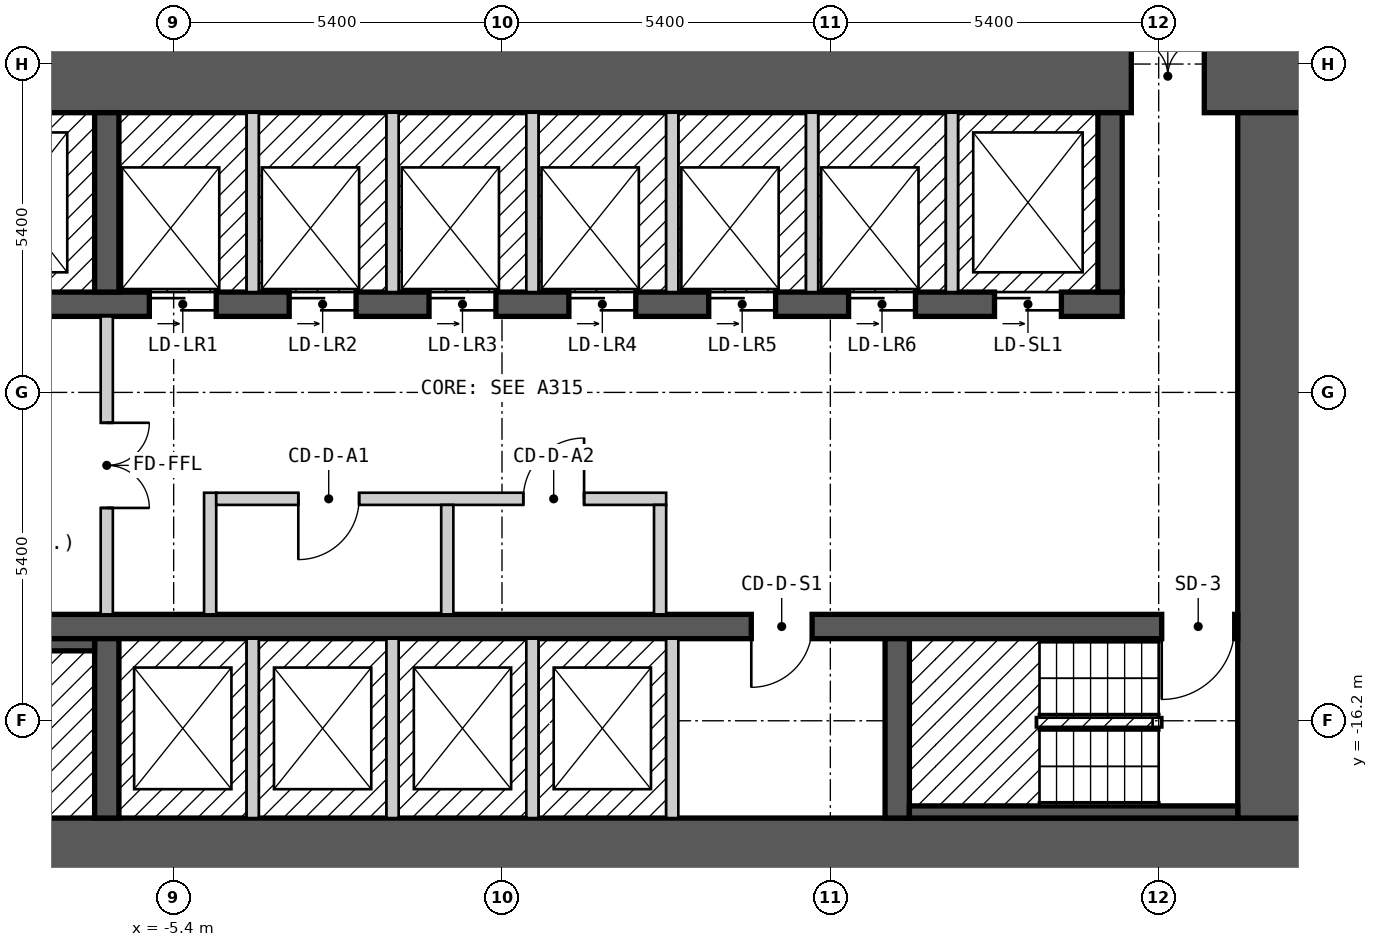
"""IFC4 building model, lengths in metres.
Left out: names, types, materials, properties, quantities, classifications, styles, units other than length and angle.
Written with IfcOpenShell. Run it as: python <this file> out.ifc"""

import sys

from ifc_helpers import new_model, si_unit, direction, frame, frame_2d, origin, place, context, subcontext, project, spatial, rectangle, extrude, element, fill, save


model = new_model("IFC4")
c1 = context("Model", 3, precision=1e-05, world=origin(), true_north=direction((0.0, 1.0)))
c2 = subcontext(c1, "Body", "Model", "MODEL_VIEW")
j1 = project(units=[si_unit("LENGTHUNIT", "METRE"), si_unit("PLANEANGLEUNIT", "RADIAN")], contexts=[c1])
p1 = place(None, origin())
s1 = spatial("IfcSite", under=j1, at=p1, CompositionType="ELEMENT")
p2 = place(p1, origin())
s2 = spatial("IfcBuilding", under=s1, at=p2, CompositionType="ELEMENT")
p3 = place(p2, frame((0.0, 0.0, 44.4)))
s3 = spatial("IfcBuildingStorey", under=s2, at=p3, CompositionType="ELEMENT", Elevation=44.4)
p4 = place(p3, frame((-13.3, -18.4, 0.0), z_axis=(0.0, 0.0, 1.0), x_axis=(1.0, 0.0, 0.0)))
e1 = element("IfcWall", 1, at=p4, inside=s3, PredefinedType="SHEAR", context=c2, shape_type="SweptSolid", body=[
    extrude(rectangle(XDim=26.6, YDim=1.2, at=frame_2d((13.3, 0.0))), origin(), (0.0, 0.0, 1.0), 2.7),
])
p5 = place(p3, frame((-13.3, -5.6, 0.0), z_axis=(0.0, 0.0, 1.0), x_axis=(1.0, 0.0, 0.0)))
e2 = element("IfcWall", 2, at=p5, inside=s3, PredefinedType="SHEAR", context=c2, shape_type="SweptSolid", body=[
    extrude(rectangle(XDim=26.6, YDim=1.2, at=frame_2d((13.3, 0.0))), origin(), (0.0, 0.0, 1.0), 2.7),
])
p6 = place(p5, frame((23.65, 0.0, 0.0)))
e3 = element("IfcOpeningElement", 3, at=p6, cuts=e2, PredefinedType="OPENING", context=c2, shape_type="SweptSolid", body=[
    extrude(rectangle(XDim=1.2, YDim=2.1, at=frame_2d((0.6, 1.05))), frame((0.0, 0.61, 0.0), z_axis=(0.0, -1.0, 0.0), x_axis=(1.0, 0.0, 0.0)), (0.0, 0.0, 1.0), 1.22),
])
p7 = place(p3, frame((12.7, -17.8, 0.0), z_axis=(0.0, 0.0, 1.0), x_axis=(0.0, 1.0, 0.0)))
e4 = element("IfcWall", 4, at=p7, inside=s3, PredefinedType="SHEAR", context=c2, shape_type="SweptSolid", body=[
    extrude(rectangle(XDim=11.6, YDim=1.2, at=frame_2d((5.8, 0.0))), origin(), (0.0, 0.0, 1.0), 2.7),
])
p8 = place(p3, frame((-12.1, -14.65, 0.0), z_axis=(0.0, 0.0, 1.0), x_axis=(1.0, 0.0, 0.0)))
e5 = element("IfcWall", 5, at=p8, inside=s3, PredefinedType="SHEAR", context=c2, shape_type="SweptSolid", body=[
    extrude(rectangle(XDim=24.2, YDim=0.4, at=frame_2d((12.1, 0.0))), origin(), (0.0, 0.0, 1.0), 2.7),
])
p9 = place(p8, frame((1.3, 0.0, 0.0), z_axis=(0.0, 0.0, 1.0), x_axis=(-1.0, 0.0, 0.0)))
e6 = element("IfcOpeningElement", 6, at=p9, cuts=e5, PredefinedType="OPENING", context=c2, shape_type="SweptSolid", body=[
    extrude(rectangle(XDim=1.2, YDim=2.1, at=frame_2d((0.6, 1.05))), frame((0.0, 0.21, 0.0), z_axis=(0.0, -1.0, 0.0), x_axis=(1.0, 0.0, 0.0)), (0.0, 0.0, 1.0), 0.42),
])
p10 = place(p8, frame((24.15, 0.0, 0.0), z_axis=(0.0, 0.0, 1.0), x_axis=(-1.0, 0.0, 0.0)))
e7 = element("IfcOpeningElement", 7, at=p10, cuts=e5, PredefinedType="OPENING", context=c2, shape_type="SweptSolid", body=[
    extrude(rectangle(XDim=1.2, YDim=2.1, at=frame_2d((0.6, 1.05))), frame((0.0, 0.21, 0.0), z_axis=(0.0, -1.0, 0.0), x_axis=(1.0, 0.0, 0.0)), (0.0, 0.0, 1.0), 0.42),
])
p11 = place(p8, frame((17.2, 0.0, 0.0), z_axis=(0.0, 0.0, 1.0), x_axis=(-1.0, 0.0, 0.0)))
e8 = element("IfcOpeningElement", 8, at=p11, cuts=e5, PredefinedType="OPENING", context=c2, shape_type="SweptSolid", body=[
    extrude(rectangle(XDim=1.0, YDim=2.1, at=frame_2d((0.5, 1.05))), frame((0.0, 0.21, 0.0), z_axis=(0.0, -1.0, 0.0), x_axis=(1.0, 0.0, 0.0)), (0.0, 0.0, 1.0), 0.42),
])
p12 = place(p3, frame((-12.1, -9.35, 0.0), z_axis=(0.0, 0.0, 1.0), x_axis=(1.0, 0.0, 0.0)))
e9 = element("IfcWall", 9, at=p12, inside=s3, PredefinedType="SHEAR", context=c2, shape_type="SweptSolid", body=[
    extrude(rectangle(XDim=22.3, YDim=0.4, at=frame_2d((11.15, 0.0))), origin(), (0.0, 0.0, 1.0), 2.7),
])
p13 = place(p12, frame((0.7, 0.0, 0.0)))
e10 = element("IfcOpeningElement", 10, at=p13, cuts=e9, PredefinedType="OPENING", context=c2, shape_type="SweptSolid", body=[
    extrude(rectangle(XDim=1.1, YDim=2.1, at=frame_2d((0.55, 1.05))), frame((0.0, 0.21, 0.0), z_axis=(0.0, -1.0, 0.0), x_axis=(1.0, 0.0, 0.0)), (0.0, 0.0, 1.0), 0.42),
])
p14 = place(p12, frame((3.5, 0.0, 0.0)))
e11 = element("IfcOpeningElement", 11, at=p14, cuts=e9, PredefinedType="OPENING", context=c2, shape_type="SweptSolid", body=[
    extrude(rectangle(XDim=1.1, YDim=2.1, at=frame_2d((0.55, 1.05))), frame((0.0, 0.21, 0.0), z_axis=(0.0, -1.0, 0.0), x_axis=(1.0, 0.0, 0.0)), (0.0, 0.0, 1.0), 0.42),
])
p15 = place(p12, frame((6.3, 0.0, 0.0)))
e12 = element("IfcOpeningElement", 12, at=p15, cuts=e9, PredefinedType="OPENING", context=c2, shape_type="SweptSolid", body=[
    extrude(rectangle(XDim=1.1, YDim=2.1, at=frame_2d((0.55, 1.05))), frame((0.0, 0.21, 0.0), z_axis=(0.0, -1.0, 0.0), x_axis=(1.0, 0.0, 0.0)), (0.0, 0.0, 1.0), 0.42),
])
p16 = place(p12, frame((8.6, 0.0, 0.0)))
e13 = element("IfcOpeningElement", 13, at=p16, cuts=e9, PredefinedType="OPENING", context=c2, shape_type="SweptSolid", body=[
    extrude(rectangle(XDim=1.1, YDim=2.1, at=frame_2d((0.55, 1.05))), frame((0.0, 0.21, 0.0), z_axis=(0.0, -1.0, 0.0), x_axis=(1.0, 0.0, 0.0)), (0.0, 0.0, 1.0), 0.42),
])
p17 = place(p12, frame((10.9, 0.0, 0.0)))
e14 = element("IfcOpeningElement", 14, at=p17, cuts=e9, PredefinedType="OPENING", context=c2, shape_type="SweptSolid", body=[
    extrude(rectangle(XDim=1.1, YDim=2.1, at=frame_2d((0.55, 1.05))), frame((0.0, 0.21, 0.0), z_axis=(0.0, -1.0, 0.0), x_axis=(1.0, 0.0, 0.0)), (0.0, 0.0, 1.0), 0.42),
])
p18 = place(p12, frame((13.2, 0.0, 0.0)))
e15 = element("IfcOpeningElement", 15, at=p18, cuts=e9, PredefinedType="OPENING", context=c2, shape_type="SweptSolid", body=[
    extrude(rectangle(XDim=1.1, YDim=2.1, at=frame_2d((0.55, 1.05))), frame((0.0, 0.21, 0.0), z_axis=(0.0, -1.0, 0.0), x_axis=(1.0, 0.0, 0.0)), (0.0, 0.0, 1.0), 0.42),
])
p19 = place(p12, frame((15.5, 0.0, 0.0)))
e16 = element("IfcOpeningElement", 16, at=p19, cuts=e9, PredefinedType="OPENING", context=c2, shape_type="SweptSolid", body=[
    extrude(rectangle(XDim=1.1, YDim=2.1, at=frame_2d((0.55, 1.05))), frame((0.0, 0.21, 0.0), z_axis=(0.0, -1.0, 0.0), x_axis=(1.0, 0.0, 0.0)), (0.0, 0.0, 1.0), 0.42),
])
p20 = place(p12, frame((17.8, 0.0, 0.0)))
e17 = element("IfcOpeningElement", 17, at=p20, cuts=e9, PredefinedType="OPENING", context=c2, shape_type="SweptSolid", body=[
    extrude(rectangle(XDim=1.1, YDim=2.1, at=frame_2d((0.55, 1.05))), frame((0.0, 0.21, 0.0), z_axis=(0.0, -1.0, 0.0), x_axis=(1.0, 0.0, 0.0)), (0.0, 0.0, 1.0), 0.42),
])
p21 = place(p12, frame((20.2, 0.0, 0.0)))
e18 = element("IfcOpeningElement", 18, at=p21, cuts=e9, PredefinedType="OPENING", context=c2, shape_type="SweptSolid", body=[
    extrude(rectangle(XDim=1.1, YDim=2.1, at=frame_2d((0.55, 1.05))), frame((0.0, 0.21, 0.0), z_axis=(0.0, -1.0, 0.0), x_axis=(1.0, 0.0, 0.0)), (0.0, 0.0, 1.0), 0.42),
])
for number, where, z_axis, x_axis in (
    (19, (-6.5, -17.8, 0.0), (0.0, 0.0, 1.0), (0.0, 1.0, 0.0)),
    (20, (6.5, -17.8, 0.0), (0.0, 0.0, 1.0), (0.0, 1.0, 0.0)),
    (21, (-6.5, -9.15, 0.0), (0.0, 0.0, 1.0), (0.0, 1.0, 0.0)),
    (22, (10.0, -9.15, 0.0), (0.0, 0.0, 1.0), (0.0, 1.0, 0.0)),
):
    element("IfcWall", number, at=place(p3, frame(where, z_axis=z_axis, x_axis=x_axis)), inside=s3, PredefinedType="SHEAR", context=c2, shape_type="SweptSolid", body=[
        extrude(rectangle(XDim=2.95, YDim=0.4, at=frame_2d((1.475, 0.0))), origin(), (0.0, 0.0, 1.0), 2.7),
    ])
p22 = place(p3, frame((-10.8, -14.95, 0.0), z_axis=(0.0, 0.0, 1.0), x_axis=(1.0, 0.0, 0.0)))
e23 = element("IfcWall", 23, at=p22, inside=s3, PredefinedType="SOLIDWALL", context=c2, shape_type="SweptSolid", body=[
    extrude(rectangle(XDim=4.1, YDim=0.2, at=frame_2d((2.05, 0.0))), origin(), (0.0, 0.0, 1.0), 2.7),
])
p23 = place(p3, frame((-6.5, -14.45, 0.0), z_axis=(0.0, 0.0, 1.0), x_axis=(0.0, 1.0, 0.0)))
e24 = element("IfcWall", 24, at=p23, inside=s3, PredefinedType="PARTITIONING", context=c2, shape_type="SweptSolid", body=[
    extrude(rectangle(XDim=4.9, YDim=0.2, at=frame_2d((2.45, 0.0))), origin(), (0.0, 0.0, 1.0), 2.7),
])
p24 = place(p23, frame((3.15, 0.0, 0.0), z_axis=(0.0, 0.0, 1.0), x_axis=(-1.0, 0.0, 0.0)))
e25 = element("IfcOpeningElement", 25, at=p24, cuts=e24, PredefinedType="OPENING", context=c2, shape_type="SweptSolid", body=[
    extrude(rectangle(XDim=1.4, YDim=2.1, at=frame_2d((0.7, 1.05))), frame((0.0, 0.11, 0.0), z_axis=(0.0, -1.0, 0.0), x_axis=(1.0, 0.0, 0.0)), (0.0, 0.0, 1.0), 0.22),
])
p25 = place(p3, frame((-4.8, -14.45, 0.0), z_axis=(0.0, 0.0, 1.0), x_axis=(0.0, 1.0, 0.0)))
e26 = element("IfcWall", 26, at=p25, inside=s3, PredefinedType="PARTITIONING", context=c2, shape_type="SweptSolid", body=[
    extrude(rectangle(XDim=2.0, YDim=0.2, at=frame_2d((1.0, 0.0))), origin(), (0.0, 0.0, 1.0), 2.7),
])
p26 = place(p3, frame((-4.7, -12.55, 0.0), z_axis=(0.0, 0.0, 1.0), x_axis=(1.0, 0.0, 0.0)))
e27 = element("IfcWall", 27, at=p26, inside=s3, PredefinedType="PARTITIONING", context=c2, shape_type="SweptSolid", body=[
    extrude(rectangle(XDim=7.4, YDim=0.2, at=frame_2d((3.7, 0.0))), origin(), (0.0, 0.0, 1.0), 2.7),
])
p27 = place(p26, frame((2.35, 0.0, 0.0), z_axis=(0.0, 0.0, 1.0), x_axis=(-1.0, 0.0, 0.0)))
e28 = element("IfcOpeningElement", 28, at=p27, cuts=e27, PredefinedType="OPENING", context=c2, shape_type="SweptSolid", body=[
    extrude(rectangle(XDim=1.0, YDim=2.1, at=frame_2d((0.5, 1.05))), frame((0.0, 0.11, 0.0), z_axis=(0.0, -1.0, 0.0), x_axis=(1.0, 0.0, 0.0)), (0.0, 0.0, 1.0), 0.22),
])
p28 = place(p26, frame((6.05, 0.0, 0.0), z_axis=(0.0, 0.0, 1.0), x_axis=(-1.0, 0.0, 0.0)))
e29 = element("IfcOpeningElement", 29, at=p28, cuts=e27, PredefinedType="OPENING", context=c2, shape_type="SweptSolid", body=[
    extrude(rectangle(XDim=1.0, YDim=2.1, at=frame_2d((0.5, 1.05))), frame((0.0, 0.11, 0.0), z_axis=(0.0, -1.0, 0.0), x_axis=(1.0, 0.0, 0.0)), (0.0, 0.0, 1.0), 0.22),
])
for number, where, z_axis, x_axis in (
    (30, (-4.1, -17.8, 0.0), (0.0, 0.0, 1.0), (0.0, 1.0, 0.0)),
    (31, (-4.1, -9.15, 0.0), (0.0, 0.0, 1.0), (0.0, 1.0, 0.0)),
    (32, (-1.8, -17.8, 0.0), (0.0, 0.0, 1.0), (0.0, 1.0, 0.0)),
    (33, (-1.8, -9.15, 0.0), (0.0, 0.0, 1.0), (0.0, 1.0, 0.0)),
):
    element("IfcWall", number, at=place(p3, frame(where, z_axis=z_axis, x_axis=x_axis)), inside=s3, PredefinedType="SOLIDWALL", context=c2, shape_type="SweptSolid", body=[
        extrude(rectangle(XDim=2.95, YDim=0.2, at=frame_2d((1.475, 0.0))), origin(), (0.0, 0.0, 1.0), 2.7),
    ])
p29 = place(p3, frame((-0.9, -14.45, 0.0), z_axis=(0.0, 0.0, 1.0), x_axis=(0.0, 1.0, 0.0)))
e34 = element("IfcWall", 34, at=p29, inside=s3, PredefinedType="PARTITIONING", context=c2, shape_type="SweptSolid", body=[
    extrude(rectangle(XDim=1.8, YDim=0.2, at=frame_2d((0.9, 0.0))), origin(), (0.0, 0.0, 1.0), 2.7),
])
for number, where, z_axis, x_axis in (
    (35, (0.5, -17.8, 0.0), (0.0, 0.0, 1.0), (0.0, 1.0, 0.0)),
    (36, (0.5, -9.15, 0.0), (0.0, 0.0, 1.0), (0.0, 1.0, 0.0)),
):
    element("IfcWall", number, at=place(p3, frame(where, z_axis=z_axis, x_axis=x_axis)), inside=s3, PredefinedType="SOLIDWALL", context=c2, shape_type="SweptSolid", body=[
        extrude(rectangle(XDim=2.95, YDim=0.2, at=frame_2d((1.475, 0.0))), origin(), (0.0, 0.0, 1.0), 2.7),
    ])
p30 = place(p3, frame((2.6, -14.45, 0.0), z_axis=(0.0, 0.0, 1.0), x_axis=(0.0, 1.0, 0.0)))
e37 = element("IfcWall", 37, at=p30, inside=s3, PredefinedType="PARTITIONING", context=c2, shape_type="SweptSolid", body=[
    extrude(rectangle(XDim=1.8, YDim=0.2, at=frame_2d((0.9, 0.0))), origin(), (0.0, 0.0, 1.0), 2.7),
])
for number, where, z_axis, x_axis in (
    (38, (2.8, -17.8, 0.0), (0.0, 0.0, 1.0), (0.0, 1.0, 0.0)),
    (39, (2.8, -9.15, 0.0), (0.0, 0.0, 1.0), (0.0, 1.0, 0.0)),
    (40, (5.1, -9.15, 0.0), (0.0, 0.0, 1.0), (0.0, 1.0, 0.0)),
):
    element("IfcWall", number, at=place(p3, frame(where, z_axis=z_axis, x_axis=x_axis)), inside=s3, PredefinedType="SOLIDWALL", context=c2, shape_type="SweptSolid", body=[
        extrude(rectangle(XDim=2.95, YDim=0.2, at=frame_2d((1.475, 0.0))), origin(), (0.0, 0.0, 1.0), 2.7),
    ])
p31 = place(p3, frame((6.7, -17.7, 0.0), z_axis=(0.0, 0.0, 1.0), x_axis=(1.0, 0.0, 0.0)))
e41 = element("IfcWall", 41, at=p31, inside=s3, PredefinedType="SOLIDWALL", context=c2, shape_type="SweptSolid", body=[
    extrude(rectangle(XDim=5.4, YDim=0.2, at=frame_2d((2.7, 0.0))), origin(), (0.0, 0.0, 1.0), 2.7),
])
p32 = place(p3, frame((7.4, -9.15, 0.0), z_axis=(0.0, 0.0, 1.0), x_axis=(0.0, 1.0, 0.0)))
e42 = element("IfcWall", 42, at=p32, inside=s3, PredefinedType="SOLIDWALL", context=c2, shape_type="SweptSolid", body=[
    extrude(rectangle(XDim=2.95, YDim=0.2, at=frame_2d((1.475, 0.0))), origin(), (0.0, 0.0, 1.0), 2.7),
])
p33 = place(p15, origin())
e43 = element("IfcDoor", 43, at=p33, inside=s3, OperationType="DOUBLE_DOOR_SLIDING", PredefinedType="DOOR", context=c2, shape_type="SweptSolid", body=[
    extrude(rectangle(XDim=1.1, YDim=2.1, at=frame_2d((0.55, 1.05))), frame((0.0, 0.025, 0.0), z_axis=(0.0, -1.0, 0.0), x_axis=(1.0, 0.0, 0.0)), (0.0, 0.0, 1.0), 0.05),
])
fill(e12, e43)
p34 = place(p16, origin())
e44 = element("IfcDoor", 44, at=p34, inside=s3, OperationType="DOUBLE_DOOR_SLIDING", PredefinedType="DOOR", context=c2, shape_type="SweptSolid", body=[
    extrude(rectangle(XDim=1.1, YDim=2.1, at=frame_2d((0.55, 1.05))), frame((0.0, 0.025, 0.0), z_axis=(0.0, -1.0, 0.0), x_axis=(1.0, 0.0, 0.0)), (0.0, 0.0, 1.0), 0.05),
])
fill(e13, e44)
p35 = place(p17, origin())
e45 = element("IfcDoor", 45, at=p35, inside=s3, OperationType="DOUBLE_DOOR_SLIDING", PredefinedType="DOOR", context=c2, shape_type="SweptSolid", body=[
    extrude(rectangle(XDim=1.1, YDim=2.1, at=frame_2d((0.55, 1.05))), frame((0.0, 0.025, 0.0), z_axis=(0.0, -1.0, 0.0), x_axis=(1.0, 0.0, 0.0)), (0.0, 0.0, 1.0), 0.05),
])
fill(e14, e45)
p36 = place(p18, origin())
e46 = element("IfcDoor", 46, at=p36, inside=s3, OperationType="DOUBLE_DOOR_SLIDING", PredefinedType="DOOR", context=c2, shape_type="SweptSolid", body=[
    extrude(rectangle(XDim=1.1, YDim=2.1, at=frame_2d((0.55, 1.05))), frame((0.0, 0.025, 0.0), z_axis=(0.0, -1.0, 0.0), x_axis=(1.0, 0.0, 0.0)), (0.0, 0.0, 1.0), 0.05),
])
fill(e15, e46)
p37 = place(p19, origin())
e47 = element("IfcDoor", 47, at=p37, inside=s3, OperationType="DOUBLE_DOOR_SLIDING", PredefinedType="DOOR", context=c2, shape_type="SweptSolid", body=[
    extrude(rectangle(XDim=1.1, YDim=2.1, at=frame_2d((0.55, 1.05))), frame((0.0, 0.025, 0.0), z_axis=(0.0, -1.0, 0.0), x_axis=(1.0, 0.0, 0.0)), (0.0, 0.0, 1.0), 0.05),
])
fill(e16, e47)
p38 = place(p20, origin())
e48 = element("IfcDoor", 48, at=p38, inside=s3, OperationType="DOUBLE_DOOR_SLIDING", PredefinedType="DOOR", context=c2, shape_type="SweptSolid", body=[
    extrude(rectangle(XDim=1.1, YDim=2.1, at=frame_2d((0.55, 1.05))), frame((0.0, 0.025, 0.0), z_axis=(0.0, -1.0, 0.0), x_axis=(1.0, 0.0, 0.0)), (0.0, 0.0, 1.0), 0.05),
])
fill(e17, e48)
p39 = place(p21, origin())
e49 = element("IfcDoor", 49, at=p39, inside=s3, OperationType="DOUBLE_DOOR_SLIDING", PredefinedType="DOOR", context=c2, shape_type="SweptSolid", body=[
    extrude(rectangle(XDim=1.1, YDim=2.1, at=frame_2d((0.55, 1.05))), frame((0.0, 0.025, 0.0), z_axis=(0.0, -1.0, 0.0), x_axis=(1.0, 0.0, 0.0)), (0.0, 0.0, 1.0), 0.05),
])
fill(e18, e49)
p40 = place(p10, origin())
e50 = element("IfcDoor", 50, at=p40, inside=s3, OperationType="SINGLE_SWING_RIGHT", PredefinedType="DOOR", context=c2, shape_type="SweptSolid", body=[
    extrude(rectangle(XDim=1.2, YDim=2.1, at=frame_2d((0.6, 1.05))), frame((0.0, 0.025, 0.0), z_axis=(0.0, -1.0, 0.0), x_axis=(1.0, 0.0, 0.0)), (0.0, 0.0, 1.0), 0.05),
])
fill(e7, e50)
p41 = place(p24, origin())
e51 = element("IfcDoor", 51, at=p41, inside=s3, OperationType="DOUBLE_DOOR_SINGLE_SWING", PredefinedType="DOOR", context=c2, shape_type="SweptSolid", body=[
    extrude(rectangle(XDim=1.4, YDim=2.1, at=frame_2d((0.7, 1.05))), frame((0.0, 0.025, 0.0), z_axis=(0.0, -1.0, 0.0), x_axis=(1.0, 0.0, 0.0)), (0.0, 0.0, 1.0), 0.05),
])
fill(e25, e51)
p42 = place(p6, origin())
e52 = element("IfcDoor", 52, at=p42, inside=s3, OperationType="DOUBLE_DOOR_SINGLE_SWING", PredefinedType="DOOR", context=c2, shape_type="SweptSolid", body=[
    extrude(rectangle(XDim=1.2, YDim=2.1, at=frame_2d((0.6, 1.05))), frame((0.0, 0.025, 0.0), z_axis=(0.0, -1.0, 0.0), x_axis=(1.0, 0.0, 0.0)), (0.0, 0.0, 1.0), 0.05),
])
fill(e3, e52)
p43 = place(p27, origin())
e53 = element("IfcDoor", 53, at=p43, inside=s3, OperationType="SINGLE_SWING_RIGHT", PredefinedType="DOOR", context=c2, shape_type="SweptSolid", body=[
    extrude(rectangle(XDim=1.0, YDim=2.1, at=frame_2d((0.5, 1.05))), frame((0.0, 0.025, 0.0), z_axis=(0.0, -1.0, 0.0), x_axis=(1.0, 0.0, 0.0)), (0.0, 0.0, 1.0), 0.05),
])
fill(e28, e53)
p44 = place(p28, origin())
e54 = element("IfcDoor", 54, at=p44, inside=s3, OperationType="SINGLE_SWING_LEFT", PredefinedType="DOOR", context=c2, shape_type="SweptSolid", body=[
    extrude(rectangle(XDim=1.0, YDim=2.1, at=frame_2d((0.5, 1.05))), frame((0.0, 0.025, 0.0), z_axis=(0.0, -1.0, 0.0), x_axis=(1.0, 0.0, 0.0)), (0.0, 0.0, 1.0), 0.05),
])
fill(e29, e54)
p45 = place(p11, origin())
e55 = element("IfcDoor", 55, at=p45, inside=s3, OperationType="SINGLE_SWING_RIGHT", PredefinedType="DOOR", context=c2, shape_type="SweptSolid", body=[
    extrude(rectangle(XDim=1.0, YDim=2.1, at=frame_2d((0.5, 1.05))), frame((0.0, 0.025, 0.0), z_axis=(0.0, -1.0, 0.0), x_axis=(1.0, 0.0, 0.0)), (0.0, 0.0, 1.0), 0.05),
])
fill(e8, e55)
save(model, sys.argv[1])
